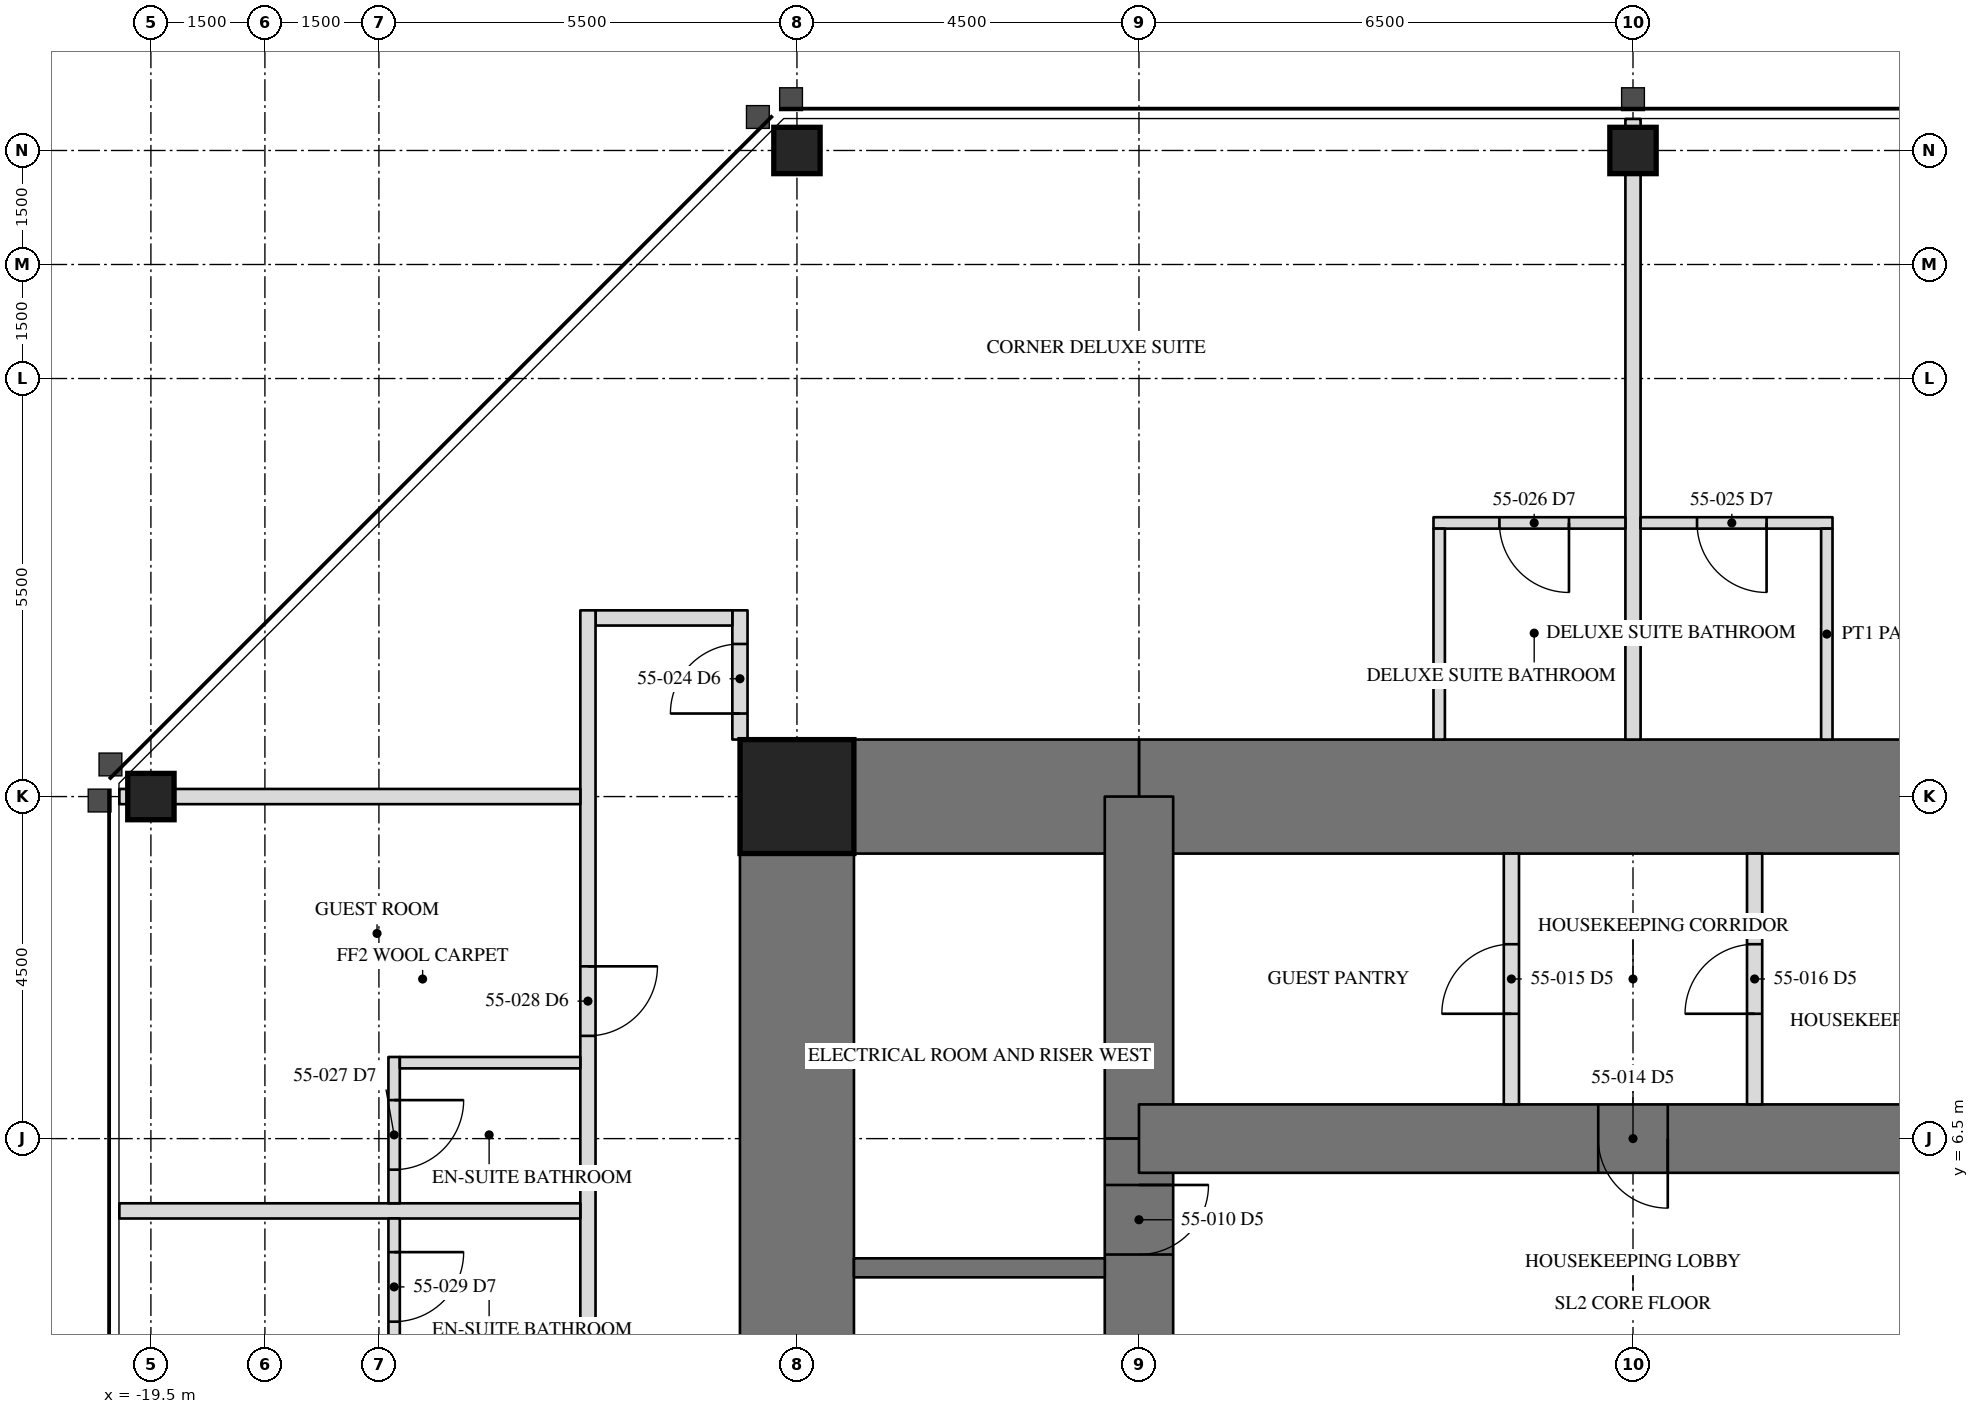
"""IFC4 building model, lengths in metres.
Left out: names, types, materials, properties, quantities, classifications, styles, units other than length and angle.
Written with IfcOpenShell. Run it as: python <this file> out.ifc"""

import sys

from ifc_helpers import new_model, si_unit, direction, frame, frame_2d, origin, origin_2d, place, context, subcontext, project, spatial, rectangle, hollow_rectangle, extrude, element, fill, save


model = new_model("IFC4")
c1 = context("Model", 3, precision=1e-05, world=origin(), true_north=direction((0.0, 1.0)))
c2 = subcontext(c1, "Body", "Model", "MODEL_VIEW")
j1 = project(units=[si_unit("LENGTHUNIT", "METRE"), si_unit("PLANEANGLEUNIT", "RADIAN")], contexts=[c1])
p1 = place(None, origin())
s1 = spatial("IfcSite", under=j1, at=p1, CompositionType="ELEMENT")
p2 = place(p1, origin())
s2 = spatial("IfcBuilding", under=s1, at=p2, CompositionType="ELEMENT")
p3 = place(p2, frame((0.0, 0.0, 229.2)))
s3 = spatial("IfcBuildingStorey", under=s2, at=p3, CompositionType="ELEMENT", Elevation=229.2)
for number, where, z_axis, x_axis in (
    (1, (0.0, 19.5, 0.0), (0.0, 0.0, 1.0), (1.0, 0.0, 0.0)),
    (2, (-11.0, 19.5, 0.0), (0.0, 0.0, 1.0), (1.0, 0.0, 0.0)),
    (3, (-19.5, 11.0, 0.0), (0.0, 0.0, 1.0), (0.0, 1.0, 0.0)),
):
    element("IfcColumn", number, at=place(p3, frame(where, z_axis=z_axis, x_axis=x_axis)), inside=s3, PredefinedType="COLUMN", context=c2, shape_type="SweptSolid", body=[
        extrude(hollow_rectangle(XDim=0.61, YDim=0.61, WallThickness=0.076, at=origin_2d()), origin(), (0.0, 0.0, 1.0), 3.5),
    ])
p4 = place(p3, frame((-11.0, 11.0, 0.0), z_axis=(0.0, 0.0, 1.0), x_axis=(0.0, -1.0, 0.0)))
e4 = element("IfcWall", 4, at=p4, inside=s3, PredefinedType="SHEAR", context=c2, shape_type="SweptSolid", body=[
    extrude(rectangle(XDim=22.0, YDim=1.5, at=frame_2d((11.0, 0.0))), origin(), (0.0, 0.0, 1.0), 3.5),
])
p5 = place(p4, frame((15.393, 0.0, 0.0)))
e5 = element("IfcOpeningElement", 5, at=p5, cuts=e4, PredefinedType="OPENING", context=c2, shape_type="SweptSolid", body=[
    extrude(rectangle(XDim=0.915, YDim=2.134, at=frame_2d((0.458, 1.067))), frame((0.0, 0.76, 0.0), z_axis=(0.0, -1.0, 0.0), x_axis=(1.0, 0.0, 0.0)), (0.0, 0.0, 1.0), 1.52),
])
p6 = place(p3, frame((6.5, 11.0, 0.0), z_axis=(0.0, 0.0, 1.0), x_axis=(-1.0, 0.0, 0.0)))
e6 = element("IfcWall", 6, at=p6, inside=s3, PredefinedType="SHEAR", context=c2, shape_type="SweptSolid", body=[
    extrude(rectangle(XDim=13.0, YDim=1.5, at=frame_2d((6.5, 0.0))), origin(), (0.0, 0.0, 1.0), 3.5),
])
p7 = place(p3, frame((-6.5, 11.0, 0.0), z_axis=(0.0, 0.0, 1.0), x_axis=(-1.0, 0.0, 0.0)))
e7 = element("IfcWall", 7, at=p7, inside=s3, PredefinedType="SHEAR", context=c2, shape_type="SweptSolid", body=[
    extrude(rectangle(XDim=4.5, YDim=1.5, at=frame_2d((2.25, 0.0))), origin(), (0.0, 0.0, 1.0), 3.5),
])
p8 = place(p3, frame((-6.5, 11.0, 0.0), z_axis=(0.0, 0.0, 1.0), x_axis=(0.0, -1.0, 0.0)))
e8 = element("IfcWall", 8, at=p8, inside=s3, PredefinedType="SHEAR", context=c2, shape_type="SweptSolid", body=[
    extrude(rectangle(XDim=4.5, YDim=0.9, at=frame_2d((2.25, 0.0))), origin(), (0.0, 0.0, 1.0), 3.5),
])
p9 = place(p3, frame((-6.5, 6.5, 0.0), z_axis=(0.0, 0.0, 1.0), x_axis=(0.0, -1.0, 0.0)))
e9 = element("IfcWall", 9, at=p9, inside=s3, PredefinedType="SHEAR", context=c2, shape_type="SweptSolid", body=[
    extrude(rectangle(XDim=13.0, YDim=0.9, at=frame_2d((6.5, 0.0))), origin(), (0.0, 0.0, 1.0), 3.5),
])
p10 = place(p9, frame((10.893, 0.0, 0.0)))
e10 = element("IfcOpeningElement", 10, at=p10, cuts=e9, PredefinedType="OPENING", context=c2, shape_type="SweptSolid", body=[
    extrude(rectangle(XDim=0.915, YDim=2.134, at=frame_2d((0.458, 1.067))), frame((0.0, 0.46, 0.0), z_axis=(0.0, -1.0, 0.0), x_axis=(1.0, 0.0, 0.0)), (0.0, 0.0, 1.0), 0.92),
])
p11 = place(p9, frame((0.61, 0.0, 0.0)))
e11 = element("IfcOpeningElement", 11, at=p11, cuts=e9, PredefinedType="OPENING", context=c2, shape_type="SweptSolid", body=[
    extrude(rectangle(XDim=0.915, YDim=2.134, at=frame_2d((0.458, 1.067))), frame((0.0, 0.46, 0.0), z_axis=(0.0, -1.0, 0.0), x_axis=(1.0, 0.0, 0.0)), (0.0, 0.0, 1.0), 0.92),
])
p12 = place(p3, frame((6.5, 6.5, 0.0), z_axis=(0.0, 0.0, 1.0), x_axis=(-1.0, 0.0, 0.0)))
e12 = element("IfcWall", 12, at=p12, inside=s3, PredefinedType="SHEAR", context=c2, shape_type="SweptSolid", body=[
    extrude(rectangle(XDim=13.0, YDim=0.9, at=frame_2d((6.5, 0.0))), origin(), (0.0, 0.0, 1.0), 3.5),
])
p13 = place(p12, frame((6.042, 0.0, 0.0)))
e13 = element("IfcOpeningElement", 13, at=p13, cuts=e12, PredefinedType="OPENING", context=c2, shape_type="SweptSolid", body=[
    extrude(rectangle(XDim=0.915, YDim=2.134, at=frame_2d((0.458, 1.067))), frame((0.0, 0.46, 0.0), z_axis=(0.0, -1.0, 0.0), x_axis=(1.0, 0.0, 0.0)), (0.0, 0.0, 1.0), 0.92),
])
p14 = place(p3, frame((-11.0, 11.0, 0.0), z_axis=(0.0, 0.0, 1.0), x_axis=(1.0, 0.0, 0.0)))
e14 = element("IfcColumn", 14, at=p14, inside=s3, PredefinedType="COLUMN", context=c2, shape_type="SweptSolid", body=[
    extrude(hollow_rectangle(XDim=1.499, YDim=1.499, WallThickness=0.102, at=origin_2d()), origin(), (0.0, 0.0, 1.0), 3.5),
])
p15 = place(p3, frame((-6.95, 4.8, 0.0), z_axis=(0.0, 0.0, 1.0), x_axis=(-1.0, 0.0, 0.0)))
e15 = element("IfcWall", 15, at=p15, inside=s3, PredefinedType="SOLIDWALL", context=c2, shape_type="SweptSolid", body=[
    extrude(rectangle(XDim=3.3, YDim=0.25, at=frame_2d((1.65, 0.0))), origin(), (0.0, 0.0, 1.0), 3.31),
])
p16 = place(p3, frame((-1.6, 6.95, 0.0), z_axis=(0.0, 0.0, 1.0), x_axis=(0.0, 1.0, 0.0)))
e16 = element("IfcWall", 16, at=p16, inside=s3, PredefinedType="PARTITIONING", context=c2, shape_type="SweptSolid", body=[
    extrude(rectangle(XDim=3.3, YDim=0.2, at=frame_2d((1.65, 0.0))), origin(), (0.0, 0.0, 1.0), 3.31),
])
p17 = place(p16, frame((1.192, 0.0, 0.0)))
e17 = element("IfcOpeningElement", 17, at=p17, cuts=e16, PredefinedType="OPENING", context=c2, shape_type="SweptSolid", body=[
    extrude(rectangle(XDim=0.915, YDim=2.134, at=frame_2d((0.458, 1.067))), frame((0.0, 0.11, 0.0), z_axis=(0.0, -1.0, 0.0), x_axis=(1.0, 0.0, 0.0)), (0.0, 0.0, 1.0), 0.22),
])
p18 = place(p3, frame((1.6, 6.95, 0.0), z_axis=(0.0, 0.0, 1.0), x_axis=(0.0, 1.0, 0.0)))
e18 = element("IfcWall", 18, at=p18, inside=s3, PredefinedType="PARTITIONING", context=c2, shape_type="SweptSolid", body=[
    extrude(rectangle(XDim=3.3, YDim=0.2, at=frame_2d((1.65, 0.0))), origin(), (0.0, 0.0, 1.0), 3.31),
])
p19 = place(p18, frame((1.192, 0.0, 0.0)))
e19 = element("IfcOpeningElement", 19, at=p19, cuts=e18, PredefinedType="OPENING", context=c2, shape_type="SweptSolid", body=[
    extrude(rectangle(XDim=0.915, YDim=2.134, at=frame_2d((0.458, 1.067))), frame((0.0, 0.11, 0.0), z_axis=(0.0, -1.0, 0.0), x_axis=(1.0, 0.0, 0.0)), (0.0, 0.0, 1.0), 0.22),
])
p20 = place(p3, frame((-11.75, 11.75, 0.0), z_axis=(0.0, 0.0, 1.0), x_axis=(0.0, 1.0, 0.0)))
e20 = element("IfcWall", 20, at=p20, inside=s3, PredefinedType="PARTITIONING", context=c2, shape_type="SweptSolid", body=[
    extrude(rectangle(XDim=1.7, YDim=0.2, at=frame_2d((0.85, 0.0))), origin(), (0.0, 0.0, 1.0), 3.31),
])
p21 = place(p20, frame((0.343, 0.0, 0.0)))
e21 = element("IfcOpeningElement", 21, at=p21, cuts=e20, PredefinedType="OPENING", context=c2, shape_type="SweptSolid", body=[
    extrude(rectangle(XDim=0.915, YDim=2.134, at=frame_2d((0.458, 1.067))), frame((0.0, 0.11, 0.0), z_axis=(0.0, -1.0, 0.0), x_axis=(1.0, 0.0, 0.0)), (0.0, 0.0, 1.0), 0.22),
])
p22 = place(p3, frame((-11.85, 13.35, 0.0), z_axis=(0.0, 0.0, 1.0), x_axis=(-1.0, 0.0, 0.0)))
e22 = element("IfcWall", 22, at=p22, inside=s3, PredefinedType="PARTITIONING", context=c2, shape_type="SweptSolid", body=[
    extrude(rectangle(XDim=1.8, YDim=0.2, at=frame_2d((0.9, 0.0))), origin(), (0.0, 0.0, 1.0), 3.31),
])
p23 = place(p3, frame((-13.75, 13.45, 0.0), z_axis=(0.0, 0.0, 1.0), x_axis=(0.0, -1.0, 0.0)))
e23 = element("IfcWall", 23, at=p23, inside=s3, PredefinedType="PARTITIONING", context=c2, shape_type="SweptSolid", body=[
    extrude(rectangle(XDim=26.7, YDim=0.2, at=frame_2d((13.35, 0.0))), origin(), (0.0, 0.0, 1.0), 3.31),
])
p24 = place(p23, frame((4.684, 0.0, 0.0)))
e24 = element("IfcOpeningElement", 24, at=p24, cuts=e23, PredefinedType="OPENING", context=c2, shape_type="SweptSolid", body=[
    extrude(rectangle(XDim=0.915, YDim=2.134, at=frame_2d((0.458, 1.067))), frame((0.0, 0.11, 0.0), z_axis=(0.0, -1.0, 0.0), x_axis=(1.0, 0.0, 0.0)), (0.0, 0.0, 1.0), 0.22),
])
p25 = place(p23, frame((10.204, 0.0, 0.0)))
e25 = element("IfcOpeningElement", 25, at=p25, cuts=e23, PredefinedType="OPENING", context=c2, shape_type="SweptSolid", body=[
    extrude(rectangle(XDim=0.915, YDim=2.134, at=frame_2d((0.458, 1.067))), frame((0.0, 0.11, 0.0), z_axis=(0.0, -1.0, 0.0), x_axis=(1.0, 0.0, 0.0)), (0.0, 0.0, 1.0), 0.22),
])
p26 = place(p23, frame((15.846, 0.0, 0.0)))
e26 = element("IfcOpeningElement", 26, at=p26, cuts=e23, PredefinedType="OPENING", context=c2, shape_type="SweptSolid", body=[
    extrude(rectangle(XDim=0.915, YDim=2.134, at=frame_2d((0.458, 1.067))), frame((0.0, 0.11, 0.0), z_axis=(0.0, -1.0, 0.0), x_axis=(1.0, 0.0, 0.0)), (0.0, 0.0, 1.0), 0.22),
])
p27 = place(p23, frame((21.366, 0.0, 0.0)))
e27 = element("IfcOpeningElement", 27, at=p27, cuts=e23, PredefinedType="OPENING", context=c2, shape_type="SweptSolid", body=[
    extrude(rectangle(XDim=0.915, YDim=2.134, at=frame_2d((0.458, 1.067))), frame((0.0, 0.11, 0.0), z_axis=(0.0, -1.0, 0.0), x_axis=(1.0, 0.0, 0.0)), (0.0, 0.0, 1.0), 0.22),
])
p28 = place(p3, frame((0.0, 11.75, 0.0), z_axis=(0.0, 0.0, 1.0), x_axis=(0.0, 1.0, 0.0)))
e28 = element("IfcWall", 28, at=p28, inside=s3, PredefinedType="PARTITIONING", context=c2, shape_type="SweptSolid", body=[
    extrude(rectangle(XDim=8.165, YDim=0.2, at=frame_2d((4.083, 0.0))), origin(), (0.0, 0.0, 1.0), 2.802),
])
p29 = place(p3, frame((2.625, 14.6, 0.0), z_axis=(0.0, 0.0, 1.0), x_axis=(-1.0, 0.0, 0.0)))
e29 = element("IfcWall", 29, at=p29, inside=s3, PredefinedType="PARTITIONING", context=c2, shape_type="SweptSolid", body=[
    extrude(rectangle(XDim=2.525, YDim=0.15, at=frame_2d((1.262, 0.0))), origin(), (0.0, 0.0, 1.0), 3.31),
])
p30 = place(p29, frame((0.867, 0.0, 0.0)))
e30 = element("IfcOpeningElement", 30, at=p30, cuts=e29, PredefinedType="OPENING", context=c2, shape_type="SweptSolid", body=[
    extrude(rectangle(XDim=0.915, YDim=2.032, at=frame_2d((0.458, 1.016))), frame((0.0, 0.085, 0.0), z_axis=(0.0, -1.0, 0.0), x_axis=(1.0, 0.0, 0.0)), (0.0, 0.0, 1.0), 0.17),
])
p31 = place(p3, frame((2.55, 11.75, 0.0), z_axis=(0.0, 0.0, 1.0), x_axis=(0.0, 1.0, 0.0)))
e31 = element("IfcWall", 31, at=p31, inside=s3, PredefinedType="PARTITIONING", context=c2, shape_type="SweptSolid", body=[
    extrude(rectangle(XDim=2.775, YDim=0.15, at=frame_2d((1.387, 0.0))), origin(), (0.0, 0.0, 1.0), 3.31),
])
p32 = place(p3, frame((-0.1, 14.6, 0.0), z_axis=(0.0, 0.0, 1.0), x_axis=(-1.0, 0.0, 0.0)))
e32 = element("IfcWall", 32, at=p32, inside=s3, PredefinedType="PARTITIONING", context=c2, shape_type="SweptSolid", body=[
    extrude(rectangle(XDim=2.525, YDim=0.15, at=frame_2d((1.262, 0.0))), origin(), (0.0, 0.0, 1.0), 3.31),
])
p33 = place(p32, frame((0.742, 0.0, 0.0)))
e33 = element("IfcOpeningElement", 33, at=p33, cuts=e32, PredefinedType="OPENING", context=c2, shape_type="SweptSolid", body=[
    extrude(rectangle(XDim=0.915, YDim=2.032, at=frame_2d((0.458, 1.016))), frame((0.0, 0.085, 0.0), z_axis=(0.0, -1.0, 0.0), x_axis=(1.0, 0.0, 0.0)), (0.0, 0.0, 1.0), 0.17),
])
p34 = place(p3, frame((-2.55, 11.75, 0.0), z_axis=(0.0, 0.0, 1.0), x_axis=(0.0, 1.0, 0.0)))
e34 = element("IfcWall", 34, at=p34, inside=s3, PredefinedType="PARTITIONING", context=c2, shape_type="SweptSolid", body=[
    extrude(rectangle(XDim=2.775, YDim=0.15, at=frame_2d((1.387, 0.0))), origin(), (0.0, 0.0, 1.0), 3.31),
])
p35 = place(p3, frame((-13.85, 11.0, 0.0), z_axis=(0.0, 0.0, 1.0), x_axis=(-1.0, 0.0, 0.0)))
e35 = element("IfcWall", 35, at=p35, inside=s3, PredefinedType="PARTITIONING", context=c2, shape_type="SweptSolid", body=[
    extrude(rectangle(XDim=6.065, YDim=0.2, at=frame_2d((3.032, 0.0))), origin(), (0.0, 0.0, 1.0), 2.802),
])
p36 = place(p3, frame((-13.85, 5.549, 0.0), z_axis=(0.0, 0.0, 1.0), x_axis=(-1.0, 0.0, 0.0)))
e36 = element("IfcWall", 36, at=p36, inside=s3, PredefinedType="PARTITIONING", context=c2, shape_type="SweptSolid", body=[
    extrude(rectangle(XDim=6.065, YDim=0.2, at=frame_2d((3.032, 0.0))), origin(), (0.0, 0.0, 1.0), 3.31),
])
p37 = place(p3, frame((-16.3, 7.574, 0.0), z_axis=(0.0, 0.0, 1.0), x_axis=(0.0, -1.0, 0.0)))
e37 = element("IfcWall", 37, at=p37, inside=s3, PredefinedType="PARTITIONING", context=c2, shape_type="SweptSolid", body=[
    extrude(rectangle(XDim=1.925, YDim=0.15, at=frame_2d((0.962, 0.0))), origin(), (0.0, 0.0, 1.0), 3.31),
])
p38 = place(p37, frame((0.567, 0.0, 0.0)))
e38 = element("IfcOpeningElement", 38, at=p38, cuts=e37, PredefinedType="OPENING", context=c2, shape_type="SweptSolid", body=[
    extrude(rectangle(XDim=0.915, YDim=2.032, at=frame_2d((0.458, 1.016))), frame((0.0, 0.085, 0.0), z_axis=(0.0, -1.0, 0.0), x_axis=(1.0, 0.0, 0.0)), (0.0, 0.0, 1.0), 0.17),
])
p39 = place(p3, frame((-13.85, 7.499, 0.0), z_axis=(0.0, 0.0, 1.0), x_axis=(-1.0, 0.0, 0.0)))
e39 = element("IfcWall", 39, at=p39, inside=s3, PredefinedType="PARTITIONING", context=c2, shape_type="SweptSolid", body=[
    extrude(rectangle(XDim=2.375, YDim=0.15, at=frame_2d((1.188, 0.0))), origin(), (0.0, 0.0, 1.0), 3.31),
])
p40 = place(p3, frame((-16.3, 5.449, 0.0), z_axis=(0.0, 0.0, 1.0), x_axis=(0.0, -1.0, 0.0)))
e40 = element("IfcWall", 40, at=p40, inside=s3, PredefinedType="PARTITIONING", context=c2, shape_type="SweptSolid", body=[
    extrude(rectangle(XDim=1.925, YDim=0.15, at=frame_2d((0.962, 0.0))), origin(), (0.0, 0.0, 1.0), 3.31),
])
p41 = place(p40, frame((0.442, 0.0, 0.0)))
e41 = element("IfcOpeningElement", 41, at=p41, cuts=e40, PredefinedType="OPENING", context=c2, shape_type="SweptSolid", body=[
    extrude(rectangle(XDim=0.915, YDim=2.032, at=frame_2d((0.458, 1.016))), frame((0.0, 0.085, 0.0), z_axis=(0.0, -1.0, 0.0), x_axis=(1.0, 0.0, 0.0)), (0.0, 0.0, 1.0), 0.17),
])
p42 = place(p11, origin())
e42 = element("IfcDoor", 42, at=p42, inside=s3, OperationType="SINGLE_SWING_RIGHT", PredefinedType="DOOR", context=c2, shape_type="SweptSolid", body=[
    extrude(rectangle(XDim=0.915, YDim=2.134, at=frame_2d((0.458, 1.067))), frame((0.0, -0.375, 0.0), z_axis=(0.0, -1.0, 0.0), x_axis=(1.0, 0.0, 0.0)), (0.0, 0.0, 1.0), 0.05),
])
fill(e11, e42)
p43 = place(p13, origin())
e43 = element("IfcDoor", 43, at=p43, inside=s3, OperationType="SINGLE_SWING_RIGHT", PredefinedType="DOOR", context=c2, shape_type="SweptSolid", body=[
    extrude(rectangle(XDim=0.915, YDim=2.134, at=frame_2d((0.458, 1.067))), frame((0.0, -0.375, 0.0), z_axis=(0.0, -1.0, 0.0), x_axis=(1.0, 0.0, 0.0)), (0.0, 0.0, 1.0), 0.05),
])
fill(e13, e43)
p44 = place(p17, origin())
e44 = element("IfcDoor", 44, at=p44, inside=s3, OperationType="SINGLE_SWING_RIGHT", PredefinedType="DOOR", context=c2, shape_type="SweptSolid", body=[
    extrude(rectangle(XDim=0.915, YDim=2.134, at=frame_2d((0.458, 1.067))), frame((0.0, 0.025, 0.0), z_axis=(0.0, -1.0, 0.0), x_axis=(1.0, 0.0, 0.0)), (0.0, 0.0, 1.0), 0.05),
])
fill(e17, e44)
p45 = place(p19, origin())
e45 = element("IfcDoor", 45, at=p45, inside=s3, OperationType="SINGLE_SWING_RIGHT", PredefinedType="DOOR", context=c2, shape_type="SweptSolid", body=[
    extrude(rectangle(XDim=0.915, YDim=2.134, at=frame_2d((0.458, 1.067))), frame((0.0, 0.025, 0.0), z_axis=(0.0, -1.0, 0.0), x_axis=(1.0, 0.0, 0.0)), (0.0, 0.0, 1.0), 0.05),
])
fill(e19, e45)
p46 = place(p21, origin())
e46 = element("IfcDoor", 46, at=p46, inside=s3, OperationType="SINGLE_SWING_LEFT", PredefinedType="DOOR", context=c2, shape_type="SweptSolid", body=[
    extrude(rectangle(XDim=0.915, YDim=2.134, at=frame_2d((0.458, 1.067))), frame((0.0, 0.025, 0.0), z_axis=(0.0, -1.0, 0.0), x_axis=(1.0, 0.0, 0.0)), (0.0, 0.0, 1.0), 0.05),
])
fill(e21, e46)
p47 = place(p30, origin())
e47 = element("IfcDoor", 47, at=p47, inside=s3, OperationType="SINGLE_SWING_LEFT", PredefinedType="DOOR", context=c2, shape_type="SweptSolid", body=[
    extrude(rectangle(XDim=0.915, YDim=2.032, at=frame_2d((0.458, 1.016))), frame((0.0, 0.025, 0.0), z_axis=(0.0, -1.0, 0.0), x_axis=(1.0, 0.0, 0.0)), (0.0, 0.0, 1.0), 0.05),
])
fill(e30, e47)
p48 = place(p33, origin())
e48 = element("IfcDoor", 48, at=p48, inside=s3, OperationType="SINGLE_SWING_LEFT", PredefinedType="DOOR", context=c2, shape_type="SweptSolid", body=[
    extrude(rectangle(XDim=0.915, YDim=2.032, at=frame_2d((0.458, 1.016))), frame((0.0, 0.025, 0.0), z_axis=(0.0, -1.0, 0.0), x_axis=(1.0, 0.0, 0.0)), (0.0, 0.0, 1.0), 0.05),
])
fill(e33, e48)
p49 = place(p38, origin())
e49 = element("IfcDoor", 49, at=p49, inside=s3, OperationType="SINGLE_SWING_LEFT", PredefinedType="DOOR", context=c2, shape_type="SweptSolid", body=[
    extrude(rectangle(XDim=0.915, YDim=2.032, at=frame_2d((0.458, 1.016))), frame((0.0, 0.025, 0.0), z_axis=(0.0, -1.0, 0.0), x_axis=(1.0, 0.0, 0.0)), (0.0, 0.0, 1.0), 0.05),
])
fill(e38, e49)
p50 = place(p24, origin())
e50 = element("IfcDoor", 50, at=p50, inside=s3, OperationType="SINGLE_SWING_LEFT", PredefinedType="DOOR", context=c2, shape_type="SweptSolid", body=[
    extrude(rectangle(XDim=0.915, YDim=2.134, at=frame_2d((0.458, 1.067))), frame((0.0, 0.025, 0.0), z_axis=(0.0, -1.0, 0.0), x_axis=(1.0, 0.0, 0.0)), (0.0, 0.0, 1.0), 0.05),
])
fill(e24, e50)
p51 = place(p41, origin())
e51 = element("IfcDoor", 51, at=p51, inside=s3, OperationType="SINGLE_SWING_LEFT", PredefinedType="DOOR", context=c2, shape_type="SweptSolid", body=[
    extrude(rectangle(XDim=0.915, YDim=2.032, at=frame_2d((0.458, 1.016))), frame((0.0, 0.025, 0.0), z_axis=(0.0, -1.0, 0.0), x_axis=(1.0, 0.0, 0.0)), (0.0, 0.0, 1.0), 0.05),
])
fill(e41, e51)
save(model, sys.argv[1])
